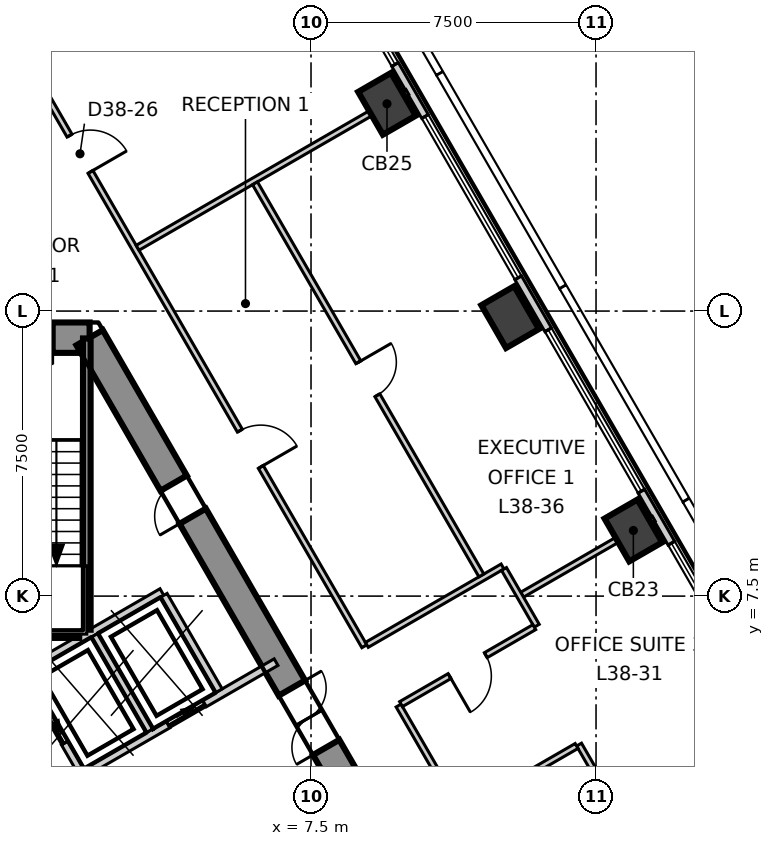
"""IFC4 building model, lengths in metres.
Left out: names, types, materials, properties, quantities, classifications, styles, units other than length and angle.
Written with IfcOpenShell. Run it as: python <this file> out.ifc"""

import sys

from ifc_helpers import new_model, si_unit, direction, frame, frame_2d, origin, origin_2d, place, context, subcontext, project, spatial, polyline, rectangle, outline, extrude, element, fill, save


model = new_model("IFC4")
c1 = context("Model", 3, precision=1e-05, world=origin(), true_north=direction((0.0, 1.0)))
c2 = subcontext(c1, "Body", "Model", "MODEL_VIEW")
j1 = project(units=[si_unit("LENGTHUNIT", "METRE"), si_unit("PLANEANGLEUNIT", "RADIAN")], contexts=[c1])
p1 = place(None, origin())
s1 = spatial("IfcSite", under=j1, at=p1, CompositionType="ELEMENT")
p2 = place(p1, origin())
s2 = spatial("IfcBuilding", under=s1, at=p2, CompositionType="ELEMENT")
p3 = place(p2, frame((0.0, 0.0, 164.3)))
s3 = spatial("IfcBuildingStorey", under=s2, at=p3, CompositionType="ELEMENT", Elevation=164.3)
p4 = place(p3, frame((1.674, 14.3, -0.3), z_axis=(0.0, 0.0, 1.0), x_axis=(-1.0, 0.0, 0.0)))
e1 = element("IfcWall", 1, at=p4, inside=s3, PredefinedType="SHEAR", context=c2, shape_type="SweptSolid", body=[
    extrude(outline(polyline([(-0.231, -0.4), (1.674, -0.4), (3.579, -0.4), (3.117, 0.4), (1.674, 0.4), (0.231, 0.4), (-0.231, -0.4)])), origin(), (0.0, 0.0, 1.0), 4.0),
])
p5 = place(p4, frame((0.974, 0.0, 0.3)))
e2 = element("IfcOpeningElement", 2, at=p5, cuts=e1, PredefinedType="OPENING", context=c2, shape_type="SweptSolid", body=[
    extrude(rectangle(XDim=1.4, YDim=2.1, at=frame_2d((0.7, 1.05))), frame((0.0, 0.41, 0.0), z_axis=(0.0, -1.0, 0.0), x_axis=(1.0, 0.0, 0.0)), (0.0, 0.0, 1.0), 0.82),
])
p6 = place(p3, frame((13.221, -5.7, -0.3), z_axis=(0.0, 0.0, 1.0), x_axis=(-0.499995765644, 0.866027848477, 0.0)))
e3 = element("IfcWall", 3, at=p6, inside=s3, PredefinedType="SHEAR", context=c2, shape_type="SweptSolid", body=[
    extrude(outline(polyline([(-0.231, -0.4), (1.732, -0.4), (3.695, -0.4), (5.658, -0.4), (7.621, -0.4), (9.584, -0.4), (11.547, -0.4), (13.51, -0.4), (15.473, -0.4), (17.436, -0.4), (19.399, -0.4), (21.362, -0.4), (23.325, -0.4), (22.863, 0.4), (20.977, 0.4), (19.091, 0.4), (17.205, 0.4), (15.319, 0.4), (13.433, 0.4), (11.547, 0.4), (9.661, 0.4), (7.775, 0.4), (5.889, 0.4), (4.003, 0.4), (2.117, 0.4), (0.231, 0.4), (-0.231, -0.4)])), origin(), (0.0, 0.0, 1.0), 4.0),
])
p7 = place(p6, frame((10.647, 0.0, 0.3)))
e4 = element("IfcOpeningElement", 4, at=p7, cuts=e3, PredefinedType="OPENING", context=c2, shape_type="SweptSolid", body=[
    extrude(rectangle(XDim=1.8, YDim=2.1, at=frame_2d((0.9, 1.05))), frame((0.0, 0.41, 0.0), z_axis=(0.0, -1.0, 0.0), x_axis=(1.0, 0.0, 0.0)), (0.0, 0.0, 1.0), 0.82),
])
p8 = place(p6, frame((17.671, 0.0, 0.3)))
e5 = element("IfcOpeningElement", 5, at=p8, cuts=e3, PredefinedType="OPENING", context=c2, shape_type="SweptSolid", body=[
    extrude(rectangle(XDim=1.0, YDim=2.1, at=frame_2d((0.5, 1.05))), frame((0.0, 0.41, 0.0), z_axis=(0.0, -1.0, 0.0), x_axis=(1.0, 0.0, 0.0)), (0.0, 0.0, 1.0), 0.82),
])
for number, where, z_axis, x_axis in (
    (6, (15.982, 9.227, -0.3), (0.0, 0.0, 1.0), (-0.5, 0.866, 0.0)),
    (7, (12.74, 14.841, -0.3), (0.0, 0.0, 1.0), (-0.5, 0.866, 0.0)),
    (8, (9.499, 20.454, -0.3), (0.0, 0.0, 1.0), (-0.5, 0.866, 0.0)),
):
    element("IfcColumn", number, at=place(p3, frame(where, z_axis=z_axis, x_axis=x_axis)), inside=s3, PredefinedType="COLUMN", context=c2, shape_type="SweptSolid", body=[
        extrude(rectangle(XDim=1.3, YDim=1.0, at=origin_2d()), origin(), (0.0, 0.0, 1.0), 4.0),
    ])
p9 = place(p3, frame((30.204, -14.006, 0.0), z_axis=(0.0, 0.0, 1.0), x_axis=(-0.500008017777, 0.866020774669, 0.0)))
e9 = element("IfcWall", 9, at=p9, inside=s3, PredefinedType="ELEMENTEDWALL", context=c2, shape_type="SweptSolid", body=[
    extrude(rectangle(XDim=54.443, YDim=0.2, at=frame_2d((27.222, 0.0))), origin(), (0.0, 0.0, 1.0), 3.7),
])
p10 = place(p9, frame((2.094, 0.0, 0.9)))
e10 = element("IfcOpeningElement", 10, at=p10, cuts=e9, PredefinedType="OPENING", context=c2, shape_type="SweptSolid", body=[
    extrude(rectangle(XDim=4.9, YDim=2.5, at=frame_2d((2.45, 1.25))), frame((0.0, 0.11, 0.0), z_axis=(0.0, -1.0, 0.0), x_axis=(1.0, 0.0, 0.0)), (0.0, 0.0, 1.0), 0.22),
])
p11 = place(p9, frame((8.576, 0.0, 0.9)))
e11 = element("IfcOpeningElement", 11, at=p11, cuts=e9, PredefinedType="OPENING", context=c2, shape_type="SweptSolid", body=[
    extrude(rectangle(XDim=4.9, YDim=2.5, at=frame_2d((2.45, 1.25))), frame((0.0, 0.11, 0.0), z_axis=(0.0, -1.0, 0.0), x_axis=(1.0, 0.0, 0.0)), (0.0, 0.0, 1.0), 0.22),
])
p12 = place(p9, frame((15.058, 0.0, 0.9)))
e12 = element("IfcOpeningElement", 12, at=p12, cuts=e9, PredefinedType="OPENING", context=c2, shape_type="SweptSolid", body=[
    extrude(rectangle(XDim=4.9, YDim=2.5, at=frame_2d((2.45, 1.25))), frame((0.0, 0.11, 0.0), z_axis=(0.0, -1.0, 0.0), x_axis=(1.0, 0.0, 0.0)), (0.0, 0.0, 1.0), 0.22),
])
p13 = place(p9, frame((21.54, 0.0, 0.9)))
e13 = element("IfcOpeningElement", 13, at=p13, cuts=e9, PredefinedType="OPENING", context=c2, shape_type="SweptSolid", body=[
    extrude(rectangle(XDim=4.9, YDim=2.5, at=frame_2d((2.45, 1.25))), frame((0.0, 0.11, 0.0), z_axis=(0.0, -1.0, 0.0), x_axis=(1.0, 0.0, 0.0)), (0.0, 0.0, 1.0), 0.22),
])
p14 = place(p9, frame((28.023, 0.0, 0.9)))
e14 = element("IfcOpeningElement", 14, at=p14, cuts=e9, PredefinedType="OPENING", context=c2, shape_type="SweptSolid", body=[
    extrude(rectangle(XDim=4.9, YDim=2.5, at=frame_2d((2.45, 1.25))), frame((0.0, 0.11, 0.0), z_axis=(0.0, -1.0, 0.0), x_axis=(1.0, 0.0, 0.0)), (0.0, 0.0, 1.0), 0.22),
])
p15 = place(p9, frame((34.505, 0.0, 0.9)))
e15 = element("IfcOpeningElement", 15, at=p15, cuts=e9, PredefinedType="OPENING", context=c2, shape_type="SweptSolid", body=[
    extrude(rectangle(XDim=4.9, YDim=2.5, at=frame_2d((2.45, 1.25))), frame((0.0, 0.11, 0.0), z_axis=(0.0, -1.0, 0.0), x_axis=(1.0, 0.0, 0.0)), (0.0, 0.0, 1.0), 0.22),
])
p16 = place(p9, frame((40.987, 0.0, 0.9)))
e16 = element("IfcOpeningElement", 16, at=p16, cuts=e9, PredefinedType="OPENING", context=c2, shape_type="SweptSolid", body=[
    extrude(rectangle(XDim=4.9, YDim=2.5, at=frame_2d((2.45, 1.25))), frame((0.0, 0.11, 0.0), z_axis=(0.0, -1.0, 0.0), x_axis=(1.0, 0.0, 0.0)), (0.0, 0.0, 1.0), 0.22),
])
p17 = place(p9, frame((47.469, 0.0, 0.9)))
e17 = element("IfcOpeningElement", 17, at=p17, cuts=e9, PredefinedType="OPENING", context=c2, shape_type="SweptSolid", body=[
    extrude(rectangle(XDim=4.9, YDim=2.5, at=frame_2d((2.45, 1.25))), frame((0.0, 0.11, 0.0), z_axis=(0.0, -1.0, 0.0), x_axis=(1.0, 0.0, 0.0)), (0.0, 0.0, 1.0), 0.22),
])
p18 = place(p3, frame((13.055, 7.537, 0.0), z_axis=(0.0, 0.0, 1.0), x_axis=(0.866026010844, 0.49999894854, 0.0)))
e18 = element("IfcWall", 18, at=p18, inside=s3, PredefinedType="PARTITIONING", context=c2, shape_type="SweptSolid", body=[
    extrude(rectangle(XDim=4.0, YDim=0.15, at=frame_2d((2.0, 0.0))), origin(), (0.0, 0.0, 1.0), 3.2),
])
p19 = place(p3, frame((0.076, 21.468, 0.0), z_axis=(0.0, 0.0, 1.0), x_axis=(0.500024127084, -0.866011473558, 0.0)))
e19 = element("IfcWall", 19, at=p19, inside=s3, PredefinedType="PARTITIONING", context=c2, shape_type="SweptSolid", body=[
    extrude(rectangle(XDim=17.654, YDim=0.15, at=frame_2d((8.827, 0.0))), origin(), (0.0, 0.0, 1.0), 3.7),
])
p20 = place(p19, frame((11.104, 0.0, 0.0)))
e20 = element("IfcOpeningElement", 20, at=p20, cuts=e19, PredefinedType="OPENING", context=c2, shape_type="SweptSolid", body=[
    extrude(rectangle(XDim=1.1, YDim=2.1, at=frame_2d((0.55, 1.05))), frame((0.0, 0.085, 0.0), z_axis=(0.0, -1.0, 0.0), x_axis=(1.0, 0.0, 0.0)), (0.0, 0.0, 1.0), 0.17),
])
p21 = place(p19, frame((2.14, 0.0, 0.0)))
e21 = element("IfcOpeningElement", 21, at=p21, cuts=e19, PredefinedType="OPENING", context=c2, shape_type="SweptSolid", body=[
    extrude(rectangle(XDim=1.1, YDim=2.1, at=frame_2d((0.55, 1.05))), frame((0.0, 0.085, 0.0), z_axis=(0.0, -1.0, 0.0), x_axis=(1.0, 0.0, 0.0)), (0.0, 0.0, 1.0), 0.17),
])
p22 = place(p3, frame((9.804, 4.62, 0.0), z_axis=(0.0, 0.0, 1.0), x_axis=(0.500000173646, -0.86602530353, 0.0)))
e22 = element("IfcWall", 22, at=p22, inside=s3, PredefinedType="PARTITIONING", context=c2, shape_type="SweptSolid", body=[
    extrude(rectangle(XDim=17.654, YDim=0.15, at=frame_2d((8.827, 0.0))), origin(), (0.0, 0.0, 1.0), 3.7),
])
p23 = place(p22, frame((14.354, 0.0, 0.0)))
e23 = element("IfcOpeningElement", 23, at=p23, cuts=e22, PredefinedType="OPENING", context=c2, shape_type="SweptSolid", body=[
    extrude(rectangle(XDim=1.1, YDim=2.1, at=frame_2d((0.55, 1.05))), frame((0.0, 0.085, 0.0), z_axis=(0.0, -1.0, 0.0), x_axis=(1.0, 0.0, 0.0)), (0.0, 0.0, 1.0), 0.17),
])
p24 = place(p22, frame((10.014, 0.0, 0.0)))
e24 = element("IfcOpeningElement", 24, at=p24, cuts=e22, PredefinedType="OPENING", context=c2, shape_type="SweptSolid", body=[
    extrude(rectangle(XDim=0.9, YDim=2.1, at=frame_2d((0.45, 1.05))), frame((0.0, 0.085, 0.0), z_axis=(0.0, -1.0, 0.0), x_axis=(1.0, 0.0, 0.0)), (0.0, 0.0, 1.0), 0.17),
])
p25 = place(p22, frame((6.814, 0.0, 0.0)))
e25 = element("IfcOpeningElement", 25, at=p25, cuts=e22, PredefinedType="OPENING", context=c2, shape_type="SweptSolid", body=[
    extrude(rectangle(XDim=0.9, YDim=2.1, at=frame_2d((0.45, 1.05))), frame((0.0, 0.085, 0.0), z_axis=(0.0, -1.0, 0.0), x_axis=(1.0, 0.0, 0.0)), (0.0, 0.0, 1.0), 0.17),
])
p26 = place(p22, frame((4.014, 0.0, 0.0)))
e26 = element("IfcOpeningElement", 26, at=p26, cuts=e22, PredefinedType="OPENING", context=c2, shape_type="SweptSolid", body=[
    extrude(rectangle(XDim=1.0, YDim=2.1, at=frame_2d((0.5, 1.05))), frame((0.0, 0.085, 0.0), z_axis=(0.0, -1.0, 0.0), x_axis=(1.0, 0.0, 0.0)), (0.0, 0.0, 1.0), 0.17),
])
p27 = place(p3, frame((2.936, 16.665, 0.0), z_axis=(0.0, 0.0, 1.0), x_axis=(0.866037308103, 0.499979380549, 0.0)))
e27 = element("IfcWall", 27, at=p27, inside=s3, PredefinedType="PARTITIONING", context=c2, shape_type="SweptSolid", body=[
    extrude(rectangle(XDim=8.198, YDim=0.15, at=frame_2d((4.099, 0.0))), origin(), (0.0, 0.0, 1.0), 3.7),
])
p28 = place(p3, frame((8.969, 6.217, 0.0), z_axis=(0.0, 0.0, 1.0), x_axis=(0.865997263264, 0.500048737644, 0.0)))
e28 = element("IfcWall", 28, at=p28, inside=s3, PredefinedType="PARTITIONING", context=c2, shape_type="SweptSolid", body=[
    extrude(rectangle(XDim=4.124, YDim=0.15, at=frame_2d((2.062, 0.0))), origin(), (0.0, 0.0, 1.0), 3.7),
])
p29 = place(p3, frame((12.578, 8.214, 0.0), z_axis=(0.0, 0.0, 1.0), x_axis=(0.499746958151, -0.866171448282, 0.0)))
e29 = element("IfcWall", 29, at=p29, inside=s3, PredefinedType="PARTITIONING", context=c2, shape_type="SweptSolid", body=[
    extrude(rectangle(XDim=1.725, YDim=0.15, at=frame_2d((0.863, 0.0))), origin(), (0.0, 0.0, 1.0), 3.7),
])
p30 = place(p3, frame((14.553, 3.593, 0.0), z_axis=(0.0, 0.0, 1.0), x_axis=(0.500054279689, -0.865994063124, 0.0)))
e30 = element("IfcWall", 30, at=p30, inside=s3, PredefinedType="PARTITIONING", context=c2, shape_type="SweptSolid", body=[
    extrude(rectangle(XDim=8.725, YDim=0.15, at=frame_2d((4.363, 0.0))), origin(), (0.0, 0.0, 1.0), 3.7),
])
p31 = place(p3, frame((11.5, 1.831, 0.0), z_axis=(0.0, 0.0, 1.0), x_axis=(0.866061862632, 0.499936846106, 0.0)))
e31 = element("IfcWall", 31, at=p31, inside=s3, PredefinedType="PARTITIONING", context=c2, shape_type="SweptSolid", body=[
    extrude(rectangle(XDim=3.45, YDim=0.15, at=frame_2d((1.725, 0.0))), origin(), (0.0, 0.0, 1.0), 3.7),
])
p32 = place(p3, frame((9.869, 4.658, 0.0), z_axis=(0.0, 0.0, 1.0), x_axis=(0.865929493314, 0.500166085025, 0.0)))
e32 = element("IfcWall", 32, at=p32, inside=s3, PredefinedType="PARTITIONING", context=c2, shape_type="SweptSolid", body=[
    extrude(rectangle(XDim=4.049, YDim=0.15, at=frame_2d((2.024, 0.0))), origin(), (0.0, 0.0, 1.0), 3.7),
])
p33 = place(p32, frame((1.474, 0.0, 0.0)))
e33 = element("IfcOpeningElement", 33, at=p33, cuts=e32, PredefinedType="OPENING", context=c2, shape_type="SweptSolid", body=[
    extrude(rectangle(XDim=1.1, YDim=2.1, at=frame_2d((0.55, 1.05))), frame((0.0, 0.085, 0.0), z_axis=(0.0, -1.0, 0.0), x_axis=(1.0, 0.0, 0.0)), (0.0, 0.0, 1.0), 0.17),
])
p34 = place(p3, frame((6.026, 18.362, 0.0), z_axis=(0.0, 0.0, 1.0), x_axis=(0.499991479218, -0.866030323204, 0.0)))
e34 = element("IfcWall", 34, at=p34, inside=s3, PredefinedType="PARTITIONING", context=c2, shape_type="SweptSolid", body=[
    extrude(rectangle(XDim=11.914, YDim=0.15, at=frame_2d((5.957, 0.0))), origin(), (0.0, 0.0, 1.0), 3.7),
])
p35 = place(p34, frame((5.439, 0.0, 0.0)))
e35 = element("IfcOpeningElement", 35, at=p35, cuts=e34, PredefinedType="OPENING", context=c2, shape_type="SweptSolid", body=[
    extrude(rectangle(XDim=1.0, YDim=2.1, at=frame_2d((0.5, 1.05))), frame((0.0, 0.085, 0.0), z_axis=(0.0, -1.0, 0.0), x_axis=(1.0, 0.0, 0.0)), (0.0, 0.0, 1.0), 0.17),
])
p36 = place(p3, frame((-0.002, 5.542, 0.0), z_axis=(0.0, 0.0, 1.0), x_axis=(0.866103910842, 0.499863997127, 0.0)))
e36 = element("IfcWall", 36, at=p36, inside=s3, PredefinedType="SOLIDWALL", context=c2, shape_type="SweptSolid", body=[
    extrude(rectangle(XDim=4.131, YDim=0.2, at=frame_2d((2.065, 0.0))), origin(), (0.0, 0.0, 1.0), 3.7),
])
p37 = place(p3, frame((0.0, 5.4, 0.0), z_axis=(0.0, 0.0, 1.0), x_axis=(0.500103862429, -0.865965430478, 0.0)))
e37 = element("IfcWall", 37, at=p37, inside=s3, PredefinedType="SOLIDWALL", context=c2, shape_type="SweptSolid", body=[
    extrude(rectangle(XDim=2.973, YDim=0.2, at=frame_2d((1.487, 0.0))), origin(), (0.0, 0.0, 1.0), 3.7),
])
p38 = place(p37, frame((0.937, 0.0, 0.0)))
e38 = element("IfcOpeningElement", 38, at=p38, cuts=e37, PredefinedType="OPENING", context=c2, shape_type="SweptSolid", body=[
    extrude(rectangle(XDim=1.1, YDim=2.1, at=frame_2d((0.55, 1.05))), frame((0.0, 0.11, 0.0), z_axis=(0.0, -1.0, 0.0), x_axis=(1.0, 0.0, 0.0)), (0.0, 0.0, 1.0), 0.22),
])
p39 = place(p3, frame((1.577, 2.874, 0.0), z_axis=(0.0, 0.0, 1.0), x_axis=(0.866073694534, 0.499916348638, 0.0)))
e39 = element("IfcWall", 39, at=p39, inside=s3, PredefinedType="SOLIDWALL", context=c2, shape_type="SweptSolid", body=[
    extrude(rectangle(XDim=5.777, YDim=0.2, at=frame_2d((2.888, 0.0))), origin(), (0.0, 0.0, 1.0), 3.7),
])
p40 = place(p39, frame((2.497, 0.0, 0.0)))
e40 = element("IfcOpeningElement", 40, at=p40, cuts=e39, PredefinedType="OPENING", context=c2, shape_type="SweptSolid", body=[
    extrude(rectangle(XDim=1.1, YDim=2.1, at=frame_2d((0.55, 1.05))), frame((0.0, 0.11, 0.0), z_axis=(0.0, -1.0, 0.0), x_axis=(1.0, 0.0, 0.0)), (0.0, 0.0, 1.0), 0.22),
])
for number, where, z_axis, x_axis in (
    (41, (3.626, 7.52, 0.0), (0.0, 0.0, 1.0), (0.5, -0.866, 0.0)),
    (42, (1.807, 6.47, 0.0), (0.0, 0.0, 1.0), (0.5, -0.866, 0.0)),
):
    element("IfcWall", number, at=place(p3, frame(where, z_axis=z_axis, x_axis=x_axis)), inside=s3, PredefinedType="SOLIDWALL", context=c2, shape_type="SweptSolid", body=[
        extrude(rectangle(XDim=2.9, YDim=0.2, at=frame_2d((1.45, 0.0))), origin(), (0.0, 0.0, 1.0), 3.7),
    ])
p41 = place(p3, frame((1.6, 6.615, 0.0), z_axis=(0.0, 0.0, 1.0), x_axis=(0.0, 1.0, 0.0)))
e43 = element("IfcWall", 43, at=p41, inside=s3, PredefinedType="SOLIDWALL", context=c2, shape_type="SweptSolid", body=[
    extrude(rectangle(XDim=7.665, YDim=0.2, at=frame_2d((3.833, 0.0))), origin(), (0.0, 0.0, 1.0), 3.7),
])
p42 = place(p3, frame((-1.4, 6.5, 0.0), z_axis=(0.0, 0.0, 1.0), x_axis=(1.0, 0.0, 0.0)))
e44 = element("IfcWall", 44, at=p42, inside=s3, PredefinedType="SOLIDWALL", context=c2, shape_type="SweptSolid", body=[
    extrude(rectangle(XDim=2.8, YDim=0.2, at=frame_2d((1.4, 0.0))), origin(), (0.0, 0.0, 1.0), 3.7),
])
p43 = place(p13, origin())
e45 = element("IfcWindow", 45, at=p43, inside=s3, PartitioningType="SINGLE_PANEL", PredefinedType="WINDOW", context=c2, shape_type="SweptSolid", body=[
    extrude(rectangle(XDim=4.9, YDim=2.5, at=frame_2d((2.45, 1.25))), frame((0.0, 0.03, 0.0), z_axis=(0.0, -1.0, 0.0), x_axis=(1.0, 0.0, 0.0)), (0.0, 0.0, 1.0), 0.06),
])
fill(e13, e45)
p44 = place(p14, origin())
e46 = element("IfcWindow", 46, at=p44, inside=s3, PartitioningType="SINGLE_PANEL", PredefinedType="WINDOW", context=c2, shape_type="SweptSolid", body=[
    extrude(rectangle(XDim=4.9, YDim=2.5, at=frame_2d((2.45, 1.25))), frame((0.0, 0.03, 0.0), z_axis=(0.0, -1.0, 0.0), x_axis=(1.0, 0.0, 0.0)), (0.0, 0.0, 1.0), 0.06),
])
fill(e14, e46)
p45 = place(p15, origin())
e47 = element("IfcWindow", 47, at=p45, inside=s3, PartitioningType="SINGLE_PANEL", PredefinedType="WINDOW", context=c2, shape_type="SweptSolid", body=[
    extrude(rectangle(XDim=4.9, YDim=2.5, at=frame_2d((2.45, 1.25))), frame((0.0, 0.03, 0.0), z_axis=(0.0, -1.0, 0.0), x_axis=(1.0, 0.0, 0.0)), (0.0, 0.0, 1.0), 0.06),
])
fill(e15, e47)
p46 = place(p16, origin())
e48 = element("IfcWindow", 48, at=p46, inside=s3, PartitioningType="SINGLE_PANEL", PredefinedType="WINDOW", context=c2, shape_type="SweptSolid", body=[
    extrude(rectangle(XDim=4.9, YDim=2.5, at=frame_2d((2.45, 1.25))), frame((0.0, 0.03, 0.0), z_axis=(0.0, -1.0, 0.0), x_axis=(1.0, 0.0, 0.0)), (0.0, 0.0, 1.0), 0.06),
])
fill(e16, e48)
p47 = place(p38, origin())
e49 = element("IfcDoor", 49, at=p47, inside=s3, OperationType="SLIDING_TO_LEFT", PredefinedType="DOOR", context=c2, shape_type="SweptSolid", body=[
    extrude(rectangle(XDim=1.1, YDim=2.1, at=frame_2d((0.55, 1.05))), frame((0.0, 0.025, 0.0), z_axis=(0.0, -1.0, 0.0), x_axis=(1.0, 0.0, 0.0)), (0.0, 0.0, 1.0), 0.05),
])
fill(e38, e49)
p48 = place(p40, origin())
e50 = element("IfcDoor", 50, at=p48, inside=s3, OperationType="SLIDING_TO_LEFT", PredefinedType="DOOR", context=c2, shape_type="SweptSolid", body=[
    extrude(rectangle(XDim=1.1, YDim=2.1, at=frame_2d((0.55, 1.05))), frame((0.0, 0.025, 0.0), z_axis=(0.0, -1.0, 0.0), x_axis=(1.0, 0.0, 0.0)), (0.0, 0.0, 1.0), 0.05),
])
fill(e40, e50)
p49 = place(p33, origin())
e51 = element("IfcDoor", 51, at=p49, inside=s3, OperationType="SINGLE_SWING_LEFT", PredefinedType="DOOR", context=c2, shape_type="SweptSolid", body=[
    extrude(rectangle(XDim=1.1, YDim=2.1, at=frame_2d((0.55, 1.05))), frame((0.0, 0.025, 0.0), z_axis=(0.0, -1.0, 0.0), x_axis=(1.0, 0.0, 0.0)), (0.0, 0.0, 1.0), 0.05),
])
fill(e33, e51)
p50 = place(p20, origin())
e52 = element("IfcDoor", 52, at=p50, inside=s3, OperationType="SINGLE_SWING_LEFT", PredefinedType="DOOR", context=c2, shape_type="SweptSolid", body=[
    extrude(rectangle(XDim=1.1, YDim=2.1, at=frame_2d((0.55, 1.05))), frame((0.0, 0.025, 0.0), z_axis=(0.0, -1.0, 0.0), x_axis=(1.0, 0.0, 0.0)), (0.0, 0.0, 1.0), 0.05),
])
fill(e20, e52)
p51 = place(p35, origin())
e53 = element("IfcDoor", 53, at=p51, inside=s3, OperationType="SINGLE_SWING_RIGHT", PredefinedType="DOOR", context=c2, shape_type="SweptSolid", body=[
    extrude(rectangle(XDim=1.0, YDim=2.1, at=frame_2d((0.5, 1.05))), frame((0.0, 0.025, 0.0), z_axis=(0.0, -1.0, 0.0), x_axis=(1.0, 0.0, 0.0)), (0.0, 0.0, 1.0), 0.05),
])
fill(e35, e53)
p52 = place(p21, origin())
e54 = element("IfcDoor", 54, at=p52, inside=s3, OperationType="SINGLE_SWING_LEFT", PredefinedType="DOOR", context=c2, shape_type="SweptSolid", body=[
    extrude(rectangle(XDim=1.1, YDim=2.1, at=frame_2d((0.55, 1.05))), frame((0.0, 0.025, 0.0), z_axis=(0.0, -1.0, 0.0), x_axis=(1.0, 0.0, 0.0)), (0.0, 0.0, 1.0), 0.05),
])
fill(e21, e54)
p53 = place(p7, origin())
e55 = element("IfcDoor", 55, at=p53, inside=s3, OperationType="DOUBLE_DOOR_SINGLE_SWING", PredefinedType="DOOR", context=c2, shape_type="SweptSolid", body=[
    extrude(rectangle(XDim=1.8, YDim=2.1, at=frame_2d((0.9, 1.05))), frame((0.0, 0.025, 0.0), z_axis=(0.0, -1.0, 0.0), x_axis=(1.0, 0.0, 0.0)), (0.0, 0.0, 1.0), 0.05),
])
fill(e4, e55)
p54 = place(p8, origin())
e56 = element("IfcDoor", 56, at=p54, inside=s3, OperationType="SINGLE_SWING_RIGHT", PredefinedType="DOOR", context=c2, shape_type="SweptSolid", body=[
    extrude(rectangle(XDim=1.0, YDim=2.1, at=frame_2d((0.5, 1.05))), frame((0.0, 0.025, 0.0), z_axis=(0.0, -1.0, 0.0), x_axis=(1.0, 0.0, 0.0)), (0.0, 0.0, 1.0), 0.05),
])
fill(e5, e56)
save(model, sys.argv[1])
